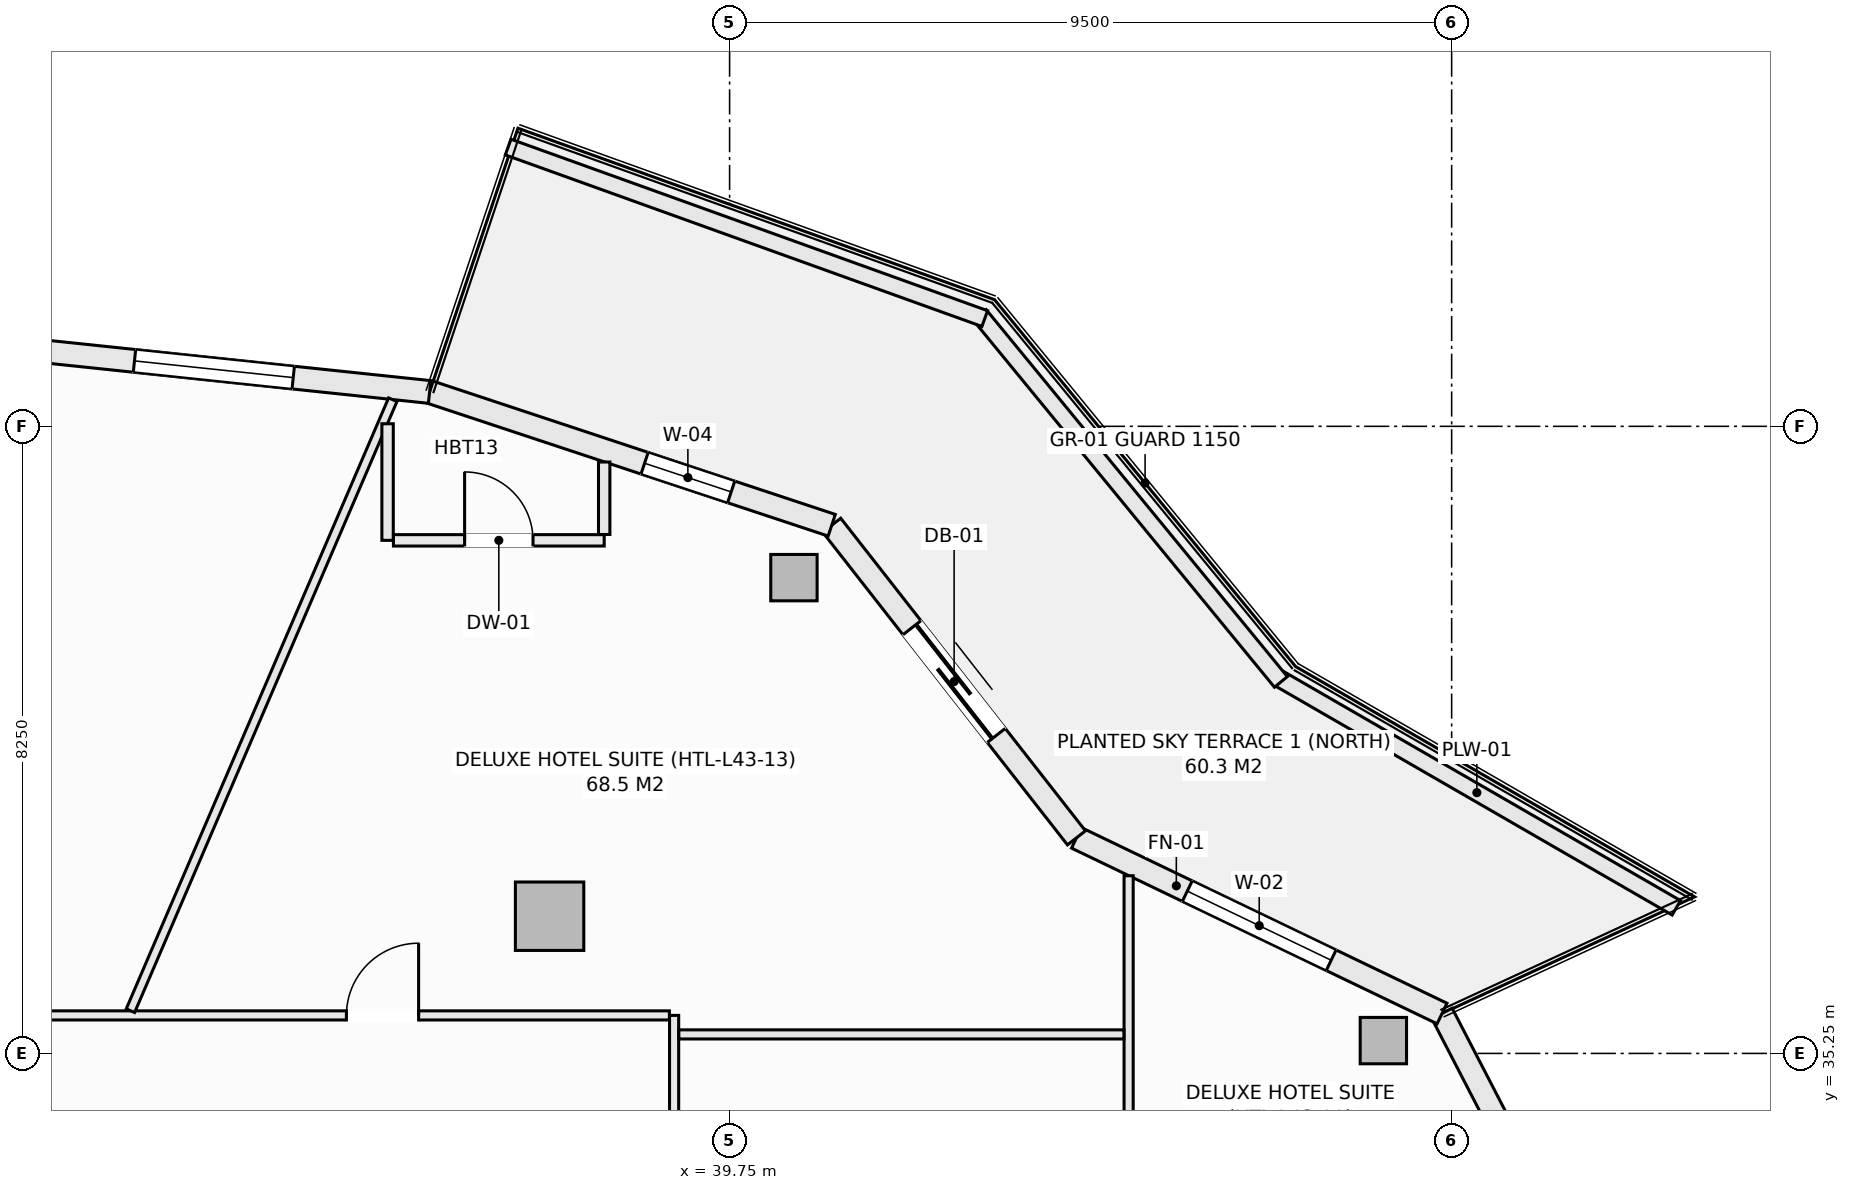
"""IFC4 building model, lengths in metres.
Left out: names, types, materials, properties, quantities, classifications, styles, units other than length and angle.
Written with IfcOpenShell. Run it as: python <this file> out.ifc"""

import sys

from ifc_helpers import new_model, si_unit, direction, frame, frame_2d, origin, origin_2d, place, context, subcontext, project, spatial, rectangle, hollow_rectangle, extrude, element, fill, save


model = new_model("IFC4")
c1 = context("Model", 3, precision=1e-05, world=origin(), true_north=direction((0.0, 1.0)))
c2 = subcontext(c1, "Body", "Model", "MODEL_VIEW")
j1 = project(units=[si_unit("LENGTHUNIT", "METRE"), si_unit("PLANEANGLEUNIT", "RADIAN")], contexts=[c1])
p1 = place(None, origin())
s1 = spatial("IfcSite", under=j1, at=p1, CompositionType="ELEMENT")
p2 = place(p1, origin())
s2 = spatial("IfcBuilding", under=s1, at=p2, CompositionType="ELEMENT")
p3 = place(p2, frame((0.0, 0.0, 166.5)))
s3 = spatial("IfcBuildingStorey", under=s2, at=p3, CompositionType="ELEMENT", Elevation=166.5)
for number, where, z_axis, x_axis in (
    (1, (48.352, 35.419, -0.27), (0.0, 0.0, 1.0), (1.0, 0.0, 0.0)),
    (2, (40.596, 41.51, -0.27), (0.0, 0.0, 1.0), (1.0, 0.0, 0.0)),
):
    element("IfcColumn", number, at=place(p3, frame(where, z_axis=z_axis, x_axis=x_axis)), inside=s3, PredefinedType="COLUMN", context=c2, shape_type="SweptSolid", body=[
        extrude(hollow_rectangle(XDim=0.61, YDim=0.61, WallThickness=0.025, at=origin_2d()), origin(), (0.0, 0.0, 1.0), 3.4),
    ])
p4 = place(p3, frame((37.382, 37.055, -0.27), z_axis=(0.0, 0.0, 1.0), x_axis=(1.0, 0.0, 0.0)))
e3 = element("IfcColumn", 3, at=p4, inside=s3, PredefinedType="COLUMN", context=c2, shape_type="SweptSolid", body=[
    extrude(rectangle(XDim=0.9, YDim=0.9, at=origin_2d()), origin(), (0.0, 0.0, 1.0), 3.4),
])
p5 = place(p3, frame((49.123, 35.775, 0.0), z_axis=(0.0, 0.0, 1.0), x_axis=(0.459810251451, -0.888017191647, 0.0)))
e4 = element("IfcWall", 4, at=p5, inside=s3, PredefinedType="SOLIDWALL", context=c2, shape_type="SweptSolid", body=[
    extrude(rectangle(XDim=4.766, YDim=0.3, at=frame_2d((2.383, 0.0))), origin(), (0.0, 0.0, 1.0), 2.653),
])
p6 = place(p5, frame((2.18, 0.0, 0.72)))
e5 = element("IfcOpeningElement", 5, at=p6, cuts=e4, PredefinedType="OPENING", context=c2, shape_type="SweptSolid", body=[
    extrude(rectangle(XDim=1.2, YDim=1.65, at=frame_2d((0.6, 0.825))), frame((0.0, 0.16, 0.0), z_axis=(0.0, -1.0, 0.0), x_axis=(1.0, 0.0, 0.0)), (0.0, 0.0, 1.0), 0.32),
])
p7 = place(p3, frame((44.313, 38.086, 0.0), z_axis=(0.0, 0.0, 1.0), x_axis=(0.901353070301, -0.433085029363, 0.0)))
e6 = element("IfcWall", 6, at=p7, inside=s3, PredefinedType="SOLIDWALL", context=c2, shape_type="SweptSolid", body=[
    extrude(rectangle(XDim=5.336, YDim=0.3, at=frame_2d((2.668, 0.0))), origin(), (0.0, 0.0, 1.0), 2.653),
])
p8 = place(p7, frame((1.618, 0.0, 0.74)))
e7 = element("IfcOpeningElement", 7, at=p8, cuts=e6, PredefinedType="OPENING", context=c2, shape_type="SweptSolid", body=[
    extrude(rectangle(XDim=2.1, YDim=1.7, at=frame_2d((1.05, 0.85))), frame((0.0, 0.16, 0.0), z_axis=(0.0, -1.0, 0.0), x_axis=(1.0, 0.0, 0.0)), (0.0, 0.0, 1.0), 0.32),
])
p9 = place(p3, frame((41.094, 42.199, 0.0), z_axis=(0.0, 0.0, 1.0), x_axis=(0.616429245738, -0.787410302828, 0.0)))
e8 = element("IfcWall", 8, at=p9, inside=s3, PredefinedType="SOLIDWALL", context=c2, shape_type="SweptSolid", body=[
    extrude(rectangle(XDim=5.223, YDim=0.3, at=frame_2d((2.612, 0.0))), origin(), (0.0, 0.0, 1.0), 2.653),
])
p10 = place(p9, frame((1.712, 0.0, 0.0)))
e9 = element("IfcOpeningElement", 9, at=p10, cuts=e8, PredefinedType="OPENING", context=c2, shape_type="SweptSolid", body=[
    extrude(rectangle(XDim=1.8, YDim=2.25, at=frame_2d((0.9, 1.125))), frame((0.0, 0.16, 0.0), z_axis=(0.0, -1.0, 0.0), x_axis=(1.0, 0.0, 0.0)), (0.0, 0.0, 1.0), 0.32),
])
p11 = place(p3, frame((35.803, 43.952, 0.0), z_axis=(0.0, 0.0, 1.0), x_axis=(0.949246811547, -0.314532177636, 0.0)))
e10 = element("IfcWall", 10, at=p11, inside=s3, PredefinedType="SOLIDWALL", context=c2, shape_type="SweptSolid", body=[
    extrude(rectangle(XDim=5.574, YDim=0.3, at=frame_2d((2.787, 0.0))), origin(), (0.0, 0.0, 1.0), 2.653),
])
p12 = place(p11, frame((2.98, 0.0, 0.72)))
e11 = element("IfcOpeningElement", 11, at=p12, cuts=e10, PredefinedType="OPENING", context=c2, shape_type="SweptSolid", body=[
    extrude(rectangle(XDim=1.2, YDim=1.65, at=frame_2d((0.6, 0.825))), frame((0.0, 0.16, 0.0), z_axis=(0.0, -1.0, 0.0), x_axis=(1.0, 0.0, 0.0)), (0.0, 0.0, 1.0), 0.32),
])
p13 = place(p3, frame((30.125, 44.55, 0.0), z_axis=(0.0, 0.0, 1.0), x_axis=(0.994496545245, -0.104769372887, 0.0)))
e12 = element("IfcWall", 12, at=p13, inside=s3, PredefinedType="SOLIDWALL", context=c2, shape_type="SweptSolid", body=[
    extrude(rectangle(XDim=5.709, YDim=0.3, at=frame_2d((2.854, 0.0))), origin(), (0.0, 0.0, 1.0), 2.653),
])
p14 = place(p13, frame((1.805, 0.0, 0.74)))
e13 = element("IfcOpeningElement", 13, at=p14, cuts=e12, PredefinedType="OPENING", context=c2, shape_type="SweptSolid", body=[
    extrude(rectangle(XDim=2.1, YDim=1.7, at=frame_2d((1.05, 0.85))), frame((0.0, 0.16, 0.0), z_axis=(0.0, -1.0, 0.0), x_axis=(1.0, 0.0, 0.0)), (0.0, 0.0, 1.0), 0.32),
])
p15 = place(p3, frame((46.958, 40.195, 0.0), z_axis=(0.0, 0.0, 1.0), x_axis=(0.866058128659, -0.499943314571, 0.0)))
e14 = element("IfcWall", 14, at=p15, inside=s3, PredefinedType="PARAPET", context=c2, shape_type="SweptSolid", body=[
    extrude(rectangle(XDim=6.06, YDim=0.22, at=frame_2d((3.03, 0.0))), origin(), (0.0, 0.0, 1.0), 0.52),
])
p16 = place(p3, frame((43.042, 44.964, 0.0), z_axis=(0.0, 0.0, 1.0), x_axis=(0.634429234628, -0.77298094818, 0.0)))
e15 = element("IfcWall", 15, at=p16, inside=s3, PredefinedType="PARAPET", context=c2, shape_type="SweptSolid", body=[
    extrude(rectangle(XDim=6.245, YDim=0.22, at=frame_2d((3.123, 0.0))), origin(), (0.0, 0.0, 1.0), 0.52),
])
p17 = place(p3, frame((36.837, 47.174, 0.0), z_axis=(0.0, 0.0, 1.0), x_axis=(0.940948576924, -0.338549517184, 0.0)))
e16 = element("IfcWall", 16, at=p17, inside=s3, PredefinedType="PARAPET", context=c2, shape_type="SweptSolid", body=[
    extrude(rectangle(XDim=6.664, YDim=0.22, at=frame_2d((3.332, 0.0))), origin(), (0.0, 0.0, 1.0), 0.52),
])
p18 = place(p3, frame((39.02, 33.75, 0.0), z_axis=(0.0, 0.0, 1.0), x_axis=(0.0, 1.0, 0.0)))
e17 = element("IfcWall", 17, at=p18, inside=s3, PredefinedType="PARTITIONING", context=c2, shape_type="SweptSolid", body=[
    extrude(rectangle(XDim=2.0, YDim=0.12, at=frame_2d((1.0, 0.0))), origin(), (0.0, 0.0, 1.0), 3.13),
])
p19 = place(p3, frame((29.842, 35.75, 0.0), z_axis=(0.0, 0.0, 1.0), x_axis=(1.0, 0.0, 0.0)))
e18 = element("IfcWall", 18, at=p19, inside=s3, PredefinedType="PARTITIONING", context=c2, shape_type="SweptSolid", body=[
    extrude(rectangle(XDim=9.116, YDim=0.12, at=frame_2d((4.558, 0.0))), origin(), (0.0, 0.0, 1.0), 2.505),
])
p20 = place(p19, frame((4.866, 0.0, 0.0)))
e19 = element("IfcOpeningElement", 19, at=p20, cuts=e18, PredefinedType="OPENING", context=c2, shape_type="SweptSolid", body=[
    extrude(rectangle(XDim=0.95, YDim=2.1, at=frame_2d((0.475, 1.05))), frame((0.0, 0.07, 0.0), z_axis=(0.0, -1.0, 0.0), x_axis=(1.0, 0.0, 0.0)), (0.0, 0.0, 1.0), 0.14),
])
p21 = place(p3, frame((45.0, 33.853, 0.0), z_axis=(0.0, 0.0, 1.0), x_axis=(0.0, 1.0, 0.0)))
e20 = element("IfcWall", 20, at=p21, inside=s3, PredefinedType="PARTITIONING", context=c2, shape_type="SweptSolid", body=[
    extrude(rectangle(XDim=3.735, YDim=0.12, at=frame_2d((1.867, 0.0))), origin(), (0.0, 0.0, 1.0), 3.13),
])
p22 = place(p3, frame((39.082, 35.5, 0.0), z_axis=(0.0, 0.0, 1.0), x_axis=(1.0, 0.0, 0.0)))
e21 = element("IfcWall", 21, at=p22, inside=s3, PredefinedType="PARTITIONING", context=c2, shape_type="SweptSolid", body=[
    extrude(rectangle(XDim=5.856, YDim=0.12, at=frame_2d((2.928, 0.0))), origin(), (0.0, 0.0, 1.0), 2.812),
])
p23 = place(p3, frame((31.867, 35.812, 0.0), z_axis=(0.0, 0.0, 1.0), x_axis=(0.394572646642, 0.918864748765, 0.0)))
e22 = element("IfcWall", 22, at=p23, inside=s3, PredefinedType="PARTITIONING", context=c2, shape_type="SweptSolid", body=[
    extrude(rectangle(XDim=8.748, YDim=0.12, at=frame_2d((4.374, 0.0))), origin(), (0.0, 0.0, 1.0), 3.13),
])
p24 = place(p3, frame((35.25, 42.0, 0.0), z_axis=(0.0, 0.0, 1.0), x_axis=(0.0, 1.0, 0.0)))
e23 = element("IfcWall", 23, at=p24, inside=s3, PredefinedType="PARTITIONING", context=c2, shape_type="SweptSolid", body=[
    extrude(rectangle(XDim=1.534, YDim=0.15, at=frame_2d((0.767, 0.0))), origin(), (0.0, 0.0, 1.0), 2.812),
])
p25 = place(p3, frame((35.327, 42.0, 0.0), z_axis=(0.0, 0.0, 1.0), x_axis=(1.0, 0.0, 0.0)))
e24 = element("IfcWall", 24, at=p25, inside=s3, PredefinedType="PARTITIONING", context=c2, shape_type="SweptSolid", body=[
    extrude(rectangle(XDim=2.773, YDim=0.15, at=frame_2d((1.387, 0.0))), origin(), (0.0, 0.0, 1.0), 2.653),
])
p26 = place(p25, frame((0.937, 0.0, 0.0)))
e25 = element("IfcOpeningElement", 25, at=p26, cuts=e24, PredefinedType="OPENING", context=c2, shape_type="SweptSolid", body=[
    extrude(rectangle(XDim=0.9, YDim=2.1, at=frame_2d((0.45, 1.05))), frame((0.0, 0.085, 0.0), z_axis=(0.0, -1.0, 0.0), x_axis=(1.0, 0.0, 0.0)), (0.0, 0.0, 1.0), 0.17),
])
p27 = place(p3, frame((38.1, 42.077, 0.0), z_axis=(0.0, 0.0, 1.0), x_axis=(0.0, 1.0, 0.0)))
e26 = element("IfcWall", 26, at=p27, inside=s3, PredefinedType="PARTITIONING", context=c2, shape_type="SweptSolid", body=[
    extrude(rectangle(XDim=0.954, YDim=0.15, at=frame_2d((0.477, 0.0))), origin(), (0.0, 0.0, 1.0), 3.13),
])
p28 = place(p8, origin())
e27 = element("IfcWindow", 27, at=p28, inside=s3, PartitioningType="SINGLE_PANEL", PredefinedType="WINDOW", context=c2, shape_type="SweptSolid", body=[
    extrude(rectangle(XDim=2.1, YDim=1.7, at=frame_2d((1.05, 0.85))), frame((0.0, 0.03, 0.0), z_axis=(0.0, -1.0, 0.0), x_axis=(1.0, 0.0, 0.0)), (0.0, 0.0, 1.0), 0.06),
])
fill(e7, e27)
p29 = place(p10, origin())
e28 = element("IfcDoor", 28, at=p29, inside=s3, OperationType="SLIDING_TO_LEFT", PredefinedType="DOOR", context=c2, shape_type="SweptSolid", body=[
    extrude(rectangle(XDim=1.8, YDim=2.25, at=frame_2d((0.9, 1.125))), frame((0.0, 0.025, 0.0), z_axis=(0.0, -1.0, 0.0), x_axis=(1.0, 0.0, 0.0)), (0.0, 0.0, 1.0), 0.05),
])
fill(e9, e28)
p30 = place(p12, origin())
e29 = element("IfcWindow", 29, at=p30, inside=s3, PartitioningType="SINGLE_PANEL", PredefinedType="WINDOW", context=c2, shape_type="SweptSolid", body=[
    extrude(rectangle(XDim=1.2, YDim=1.65, at=frame_2d((0.6, 0.825))), frame((0.0, 0.03, 0.0), z_axis=(0.0, -1.0, 0.0), x_axis=(1.0, 0.0, 0.0)), (0.0, 0.0, 1.0), 0.06),
])
fill(e11, e29)
p31 = place(p14, origin())
e30 = element("IfcWindow", 30, at=p31, inside=s3, PartitioningType="SINGLE_PANEL", PredefinedType="WINDOW", context=c2, shape_type="SweptSolid", body=[
    extrude(rectangle(XDim=2.1, YDim=1.7, at=frame_2d((1.05, 0.85))), frame((0.0, 0.03, 0.0), z_axis=(0.0, -1.0, 0.0), x_axis=(1.0, 0.0, 0.0)), (0.0, 0.0, 1.0), 0.06),
])
fill(e13, e30)
p32 = place(p20, origin())
e31 = element("IfcDoor", 31, at=p32, inside=s3, OperationType="SINGLE_SWING_RIGHT", PredefinedType="DOOR", context=c2, shape_type="SweptSolid", body=[
    extrude(rectangle(XDim=0.95, YDim=2.1, at=frame_2d((0.475, 1.05))), frame((0.0, 0.025, 0.0), z_axis=(0.0, -1.0, 0.0), x_axis=(1.0, 0.0, 0.0)), (0.0, 0.0, 1.0), 0.05),
])
fill(e19, e31)
p33 = place(p26, origin())
e32 = element("IfcDoor", 32, at=p33, inside=s3, OperationType="SINGLE_SWING_LEFT", PredefinedType="DOOR", context=c2, shape_type="SweptSolid", body=[
    extrude(rectangle(XDim=0.9, YDim=2.1, at=frame_2d((0.45, 1.05))), frame((0.0, 0.025, 0.0), z_axis=(0.0, -1.0, 0.0), x_axis=(1.0, 0.0, 0.0)), (0.0, 0.0, 1.0), 0.05),
])
fill(e25, e32)
save(model, sys.argv[1])
